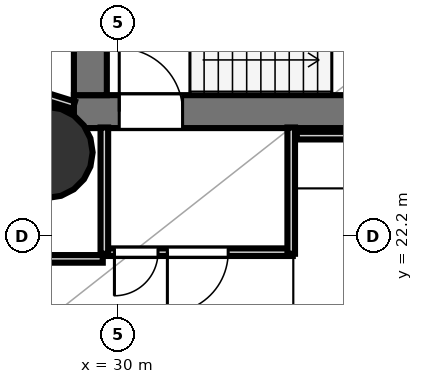
"""IFC4 building model, lengths in metres.
Left out: names, types, materials, properties, quantities, classifications, styles, units other than length and angle.
Written with IfcOpenShell. Run it as: python <this file> out.ifc"""

import sys

from ifc_helpers import new_model, si_unit, direction, frame, frame_2d, origin, origin_2d, place, context, subcontext, project, spatial, rectangle, hollow_circle, extrude, element, fill, save


model = new_model("IFC4")
c1 = context("Model", 3, precision=1e-05, world=origin(), true_north=direction((0.0, 1.0)))
c2 = subcontext(c1, "Body", "Model", "MODEL_VIEW")
j1 = project(units=[si_unit("LENGTHUNIT", "METRE"), si_unit("PLANEANGLEUNIT", "RADIAN")], contexts=[c1])
p1 = place(None, origin())
s1 = spatial("IfcSite", under=j1, at=p1, CompositionType="ELEMENT")
p2 = place(p1, origin())
s2 = spatial("IfcBuilding", under=s1, at=p2, CompositionType="ELEMENT")
p3 = place(p2, frame((0.0, 0.0, 25.7)))
s3 = spatial("IfcBuildingStorey", under=s2, at=p3, CompositionType="ELEMENT", Elevation=25.7)
p4 = place(p3, frame((29.13, 24.655, 0.0), z_axis=(0.0, 0.0, 1.0), x_axis=(1.0, 0.0, 0.0)))
e1 = element("IfcWall", 1, at=p4, inside=s3, PredefinedType="SHEAR", context=c2, shape_type="SweptSolid", body=[
    extrude(rectangle(XDim=10.72, YDim=0.65, at=frame_2d((5.36, 0.0))), origin(), (0.0, 0.0, 1.0), 3.52),
])
p5 = place(p4, frame((0.895, 0.0, 0.0)))
e2 = element("IfcOpeningElement", 2, at=p5, cuts=e1, PredefinedType="OPENING", context=c2, shape_type="SweptSolid", body=[
    extrude(rectangle(XDim=1.25, YDim=2.15, at=frame_2d((0.625, 1.075))), frame((0.0, 0.335, 0.0), z_axis=(0.0, -1.0, 0.0), x_axis=(1.0, 0.0, 0.0)), (0.0, 0.0, 1.0), 0.67),
])
p6 = place(p3, frame((29.455, 24.98, 0.0), z_axis=(0.0, 0.0, 1.0), x_axis=(0.0, 1.0, 0.0)))
e3 = element("IfcWall", 3, at=p6, inside=s3, PredefinedType="SHEAR", context=c2, shape_type="SweptSolid", body=[
    extrude(rectangle(XDim=7.44, YDim=0.65, at=frame_2d((3.72, 0.0))), origin(), (0.0, 0.0, 1.0), 3.52),
])
p7 = place(p3, frame((28.6, 23.85, 0.0), z_axis=(0.0, 0.0, 1.0), x_axis=(1.0, 0.0, 0.0)))
e4 = element("IfcColumn", 4, at=p7, inside=s3, PredefinedType="COLUMN", context=c2, shape_type="SweptSolid", body=[
    extrude(hollow_circle(Radius=0.9, WallThickness=0.045, at=origin_2d()), origin(), (0.0, 0.0, 1.0), 3.7),
])
p8 = place(p3, frame((33.45, 21.881, 0.0), z_axis=(0.0, 0.0, 1.0), x_axis=(-1.0, 0.0, 0.0)))
e5 = element("IfcWall", 5, at=p8, inside=s3, PredefinedType="PARTITIONING", context=c2, shape_type="SweptSolid", body=[
    extrude(rectangle(XDim=3.75, YDim=0.15, at=frame_2d((1.875, 0.0))), origin(), (0.0, 0.0, 1.0), 2.84),
])
p9 = place(p8, frame((1.275, 0.0, 0.0)))
e6 = element("IfcOpeningElement", 6, at=p9, cuts=e5, PredefinedType="OPENING", context=c2, shape_type="SweptSolid", body=[
    extrude(rectangle(XDim=1.2, YDim=2.15, at=frame_2d((0.6, 1.075))), frame((0.0, 0.085, 0.0), z_axis=(0.0, -1.0, 0.0), x_axis=(1.0, 0.0, 0.0)), (0.0, 0.0, 1.0), 0.17),
])
p10 = place(p8, frame((2.66, 0.0, 0.0)))
e7 = element("IfcOpeningElement", 7, at=p10, cuts=e5, PredefinedType="OPENING", context=c2, shape_type="SweptSolid", body=[
    extrude(rectangle(XDim=0.86, YDim=2.05, at=frame_2d((0.43, 1.025))), frame((0.0, 0.085, 0.0), z_axis=(0.0, -1.0, 0.0), x_axis=(1.0, 0.0, 0.0)), (0.0, 0.0, 1.0), 0.17),
])
for number, where, z_axis, x_axis in (
    (8, (29.731, 21.85, 0.0), (0.0, 0.0, 1.0), (0.0, 1.0, 0.0)),
    (9, (33.419, 24.342, 0.0), (0.0, 0.0, 1.0), (0.0, -1.0, 0.0)),
):
    element("IfcWall", number, at=place(p3, frame(where, z_axis=z_axis, x_axis=x_axis)), inside=s3, PredefinedType="PARTITIONING", context=c2, shape_type="SweptSolid", body=[
        extrude(rectangle(XDim=2.492, YDim=0.15, at=frame_2d((1.246, 0.0))), origin(), (0.0, 0.0, 1.0), 2.84),
    ])
p11 = place(p3, frame((29.13, 24.782, 0.0), z_axis=(0.0, 0.0, 1.0), x_axis=(-0.955000482512, 0.296604245422, 0.0)))
e10 = element("IfcWall", 10, at=p11, inside=s3, PredefinedType="PARTITIONING", context=c2, shape_type="SweptSolid", body=[
    extrude(rectangle(XDim=0.524, YDim=0.15, at=frame_2d((0.262, 0.0))), origin(), (0.0, 0.0, 1.0), 2.84),
])
p12 = place(p3, frame((37.389, 24.181, 0.0), z_axis=(0.0, 0.0, 1.0), x_axis=(-1.0, 0.0, 0.0)))
e11 = element("IfcWall", 11, at=p12, inside=s3, PredefinedType="PARTITIONING", context=c2, shape_type="SweptSolid", body=[
    extrude(rectangle(XDim=3.859, YDim=0.15, at=frame_2d((1.929, 0.0))), origin(), (0.0, 0.0, 1.0), 2.84),
])
p13 = place(p3, frame((26.42, 21.749, 0.0), z_axis=(0.0, 0.0, 1.0), x_axis=(1.0, 0.0, 0.0)))
e12 = element("IfcWall", 12, at=p13, inside=s3, PredefinedType="PARTITIONING", context=c2, shape_type="SweptSolid", body=[
    extrude(rectangle(XDim=3.28, YDim=0.15, at=frame_2d((1.64, 0.0))), origin(), (0.0, 0.0, 1.0), 2.84),
])
p14 = place(p5, origin())
e13 = element("IfcDoor", 13, at=p14, inside=s3, OperationType="SINGLE_SWING_LEFT", PredefinedType="DOOR", context=c2, shape_type="SweptSolid", body=[
    extrude(rectangle(XDim=1.25, YDim=2.15, at=frame_2d((0.625, 1.075))), frame((0.0, 0.025, 0.0), z_axis=(0.0, -1.0, 0.0), x_axis=(1.0, 0.0, 0.0)), (0.0, 0.0, 1.0), 0.05),
])
fill(e2, e13)
p15 = place(p9, origin())
e14 = element("IfcDoor", 14, at=p15, inside=s3, OperationType="SINGLE_SWING_RIGHT", PredefinedType="DOOR", context=c2, shape_type="SweptSolid", body=[
    extrude(rectangle(XDim=1.2, YDim=2.15, at=frame_2d((0.6, 1.075))), frame((0.0, 0.025, 0.0), z_axis=(0.0, -1.0, 0.0), x_axis=(1.0, 0.0, 0.0)), (0.0, 0.0, 1.0), 0.05),
])
fill(e6, e14)
p16 = place(p10, origin())
e15 = element("IfcDoor", 15, at=p16, inside=s3, OperationType="SINGLE_SWING_RIGHT", PredefinedType="DOOR", context=c2, shape_type="SweptSolid", body=[
    extrude(rectangle(XDim=0.86, YDim=2.05, at=frame_2d((0.43, 1.025))), frame((0.0, 0.025, 0.0), z_axis=(0.0, -1.0, 0.0), x_axis=(1.0, 0.0, 0.0)), (0.0, 0.0, 1.0), 0.05),
])
fill(e7, e15)
save(model, sys.argv[1])
